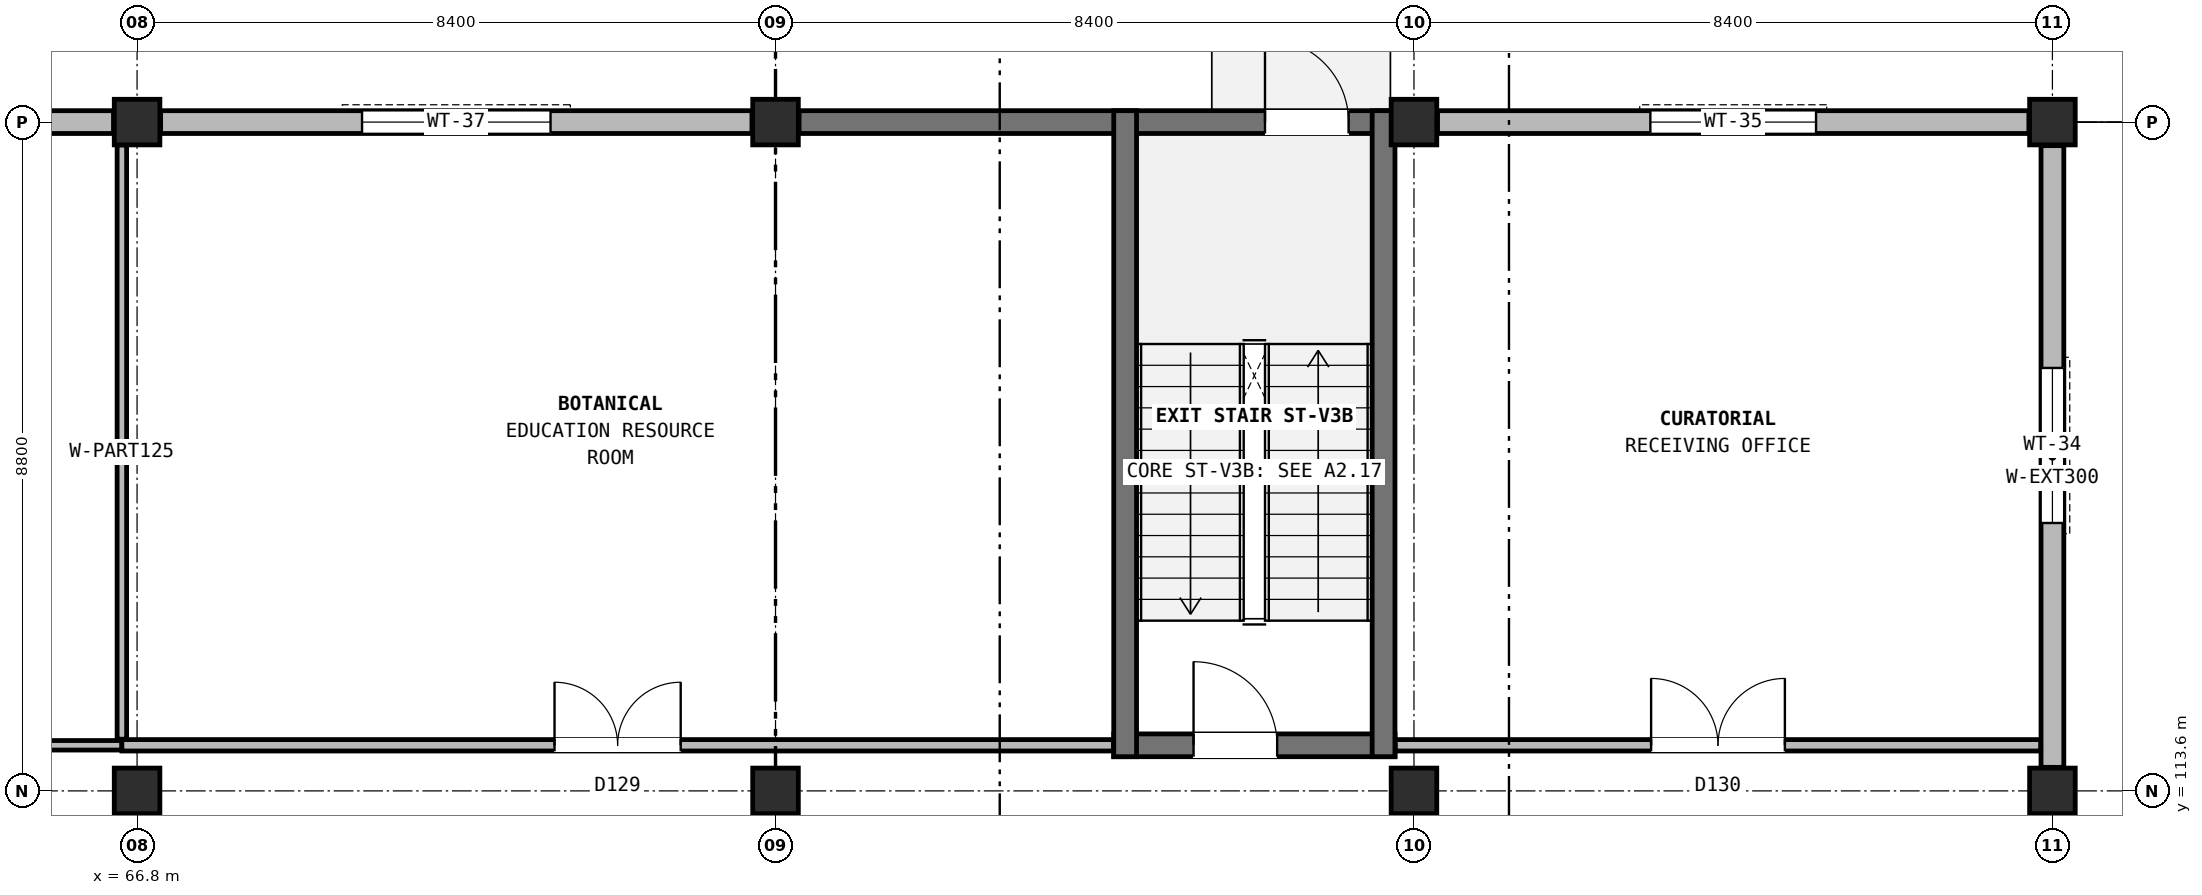
"""IFC4 building model, lengths in metres.
Left out: names, types, materials, properties, quantities, classifications, styles, units other than length and angle.
Written with IfcOpenShell. Run it as: python <this file> out.ifc"""

import sys

from ifc_helpers import new_model, si_unit, direction, frame, frame_2d, origin, origin_2d, place, context, subcontext, project, spatial, rectangle, extrude, element, fill, save


model = new_model("IFC4")
c1 = context("Model", 3, precision=1e-05, world=origin(), true_north=direction((0.0, 1.0)))
c2 = subcontext(c1, "Body", "Model", "MODEL_VIEW")
j1 = project(units=[si_unit("LENGTHUNIT", "METRE"), si_unit("PLANEANGLEUNIT", "RADIAN")], contexts=[c1])
p1 = place(None, origin())
s1 = spatial("IfcSite", under=j1, at=p1, CompositionType="ELEMENT")
p2 = place(p1, origin())
s2 = spatial("IfcBuilding", under=s1, at=p2, CompositionType="ELEMENT")
p3 = place(p2, origin())
s3 = spatial("IfcBuildingStorey", under=s2, at=p3, CompositionType="ELEMENT", Elevation=0.0)
for number, where, z_axis, x_axis in (
    (1, (66.8, 113.6, 0.0), (0.0, 0.0, 1.0), (1.0, 0.0, 0.0)),
    (2, (66.8, 122.4, 0.0), (0.0, 0.0, 1.0), (1.0, 0.0, 0.0)),
    (3, (75.2, 113.6, 0.0), (0.0, 0.0, 1.0), (1.0, 0.0, 0.0)),
    (4, (75.2, 122.4, 0.0), (0.0, 0.0, 1.0), (1.0, 0.0, 0.0)),
    (5, (83.6, 113.6, 0.0), (0.0, 0.0, 1.0), (1.0, 0.0, 0.0)),
    (6, (83.6, 122.4, 0.0), (0.0, 0.0, 1.0), (1.0, 0.0, 0.0)),
    (7, (92.0, 113.6, 0.0), (0.0, 0.0, 1.0), (1.0, 0.0, 0.0)),
    (8, (92.0, 122.4, 0.0), (0.0, 0.0, 1.0), (1.0, 0.0, 0.0)),
):
    element("IfcColumn", number, at=place(p3, frame(where, z_axis=z_axis, x_axis=x_axis)), inside=s3, PredefinedType="COLUMN", context=c2, shape_type="SweptSolid", body=[
        extrude(rectangle(XDim=0.6, YDim=0.6, at=origin_2d()), origin(), (0.0, 0.0, 1.0), 4.8),
    ])
p4 = place(p3, frame((92.0, 105.11, 0.0), z_axis=(0.0, 0.0, 1.0), x_axis=(0.0, 1.0, 0.0)))
e9 = element("IfcWall", 9, at=p4, inside=s3, PredefinedType="SOLIDWALL", context=c2, shape_type="SweptSolid", body=[
    extrude(rectangle(XDim=8.18, YDim=0.3, at=frame_2d((4.09, 0.0))), origin(), (0.0, 0.0, 1.0), 4.05),
])
p5 = place(p4, frame((2.005, 0.0, 0.9)))
e10 = element("IfcOpeningElement", 10, at=p5, cuts=e9, PredefinedType="OPENING", context=c2, shape_type="SweptSolid", body=[
    extrude(rectangle(XDim=1.88, YDim=1.96, at=frame_2d((0.94, 0.98))), frame((0.0, 0.16, 0.0), z_axis=(0.0, -1.0, 0.0), x_axis=(1.0, 0.0, 0.0)), (0.0, 0.0, 1.0), 0.32),
])
p6 = place(p3, frame((92.0, 113.91, 0.0), z_axis=(0.0, 0.0, 1.0), x_axis=(0.0, 1.0, 0.0)))
e11 = element("IfcWall", 11, at=p6, inside=s3, PredefinedType="SOLIDWALL", context=c2, shape_type="SweptSolid", body=[
    extrude(rectangle(XDim=8.18, YDim=0.3, at=frame_2d((4.09, 0.0))), origin(), (0.0, 0.0, 1.0), 4.05),
])
p7 = place(p6, frame((3.215, 0.0, 0.9)))
e12 = element("IfcOpeningElement", 12, at=p7, cuts=e11, PredefinedType="OPENING", context=c2, shape_type="SweptSolid", body=[
    extrude(rectangle(XDim=2.04, YDim=1.98, at=frame_2d((1.02, 0.99))), frame((0.0, 0.16, 0.0), z_axis=(0.0, -1.0, 0.0), x_axis=(1.0, 0.0, 0.0)), (0.0, 0.0, 1.0), 0.32),
])
p8 = place(p3, frame((91.69, 122.4, 0.0), z_axis=(0.0, 0.0, 1.0), x_axis=(-1.0, 0.0, 0.0)))
e13 = element("IfcWall", 13, at=p8, inside=s3, PredefinedType="SOLIDWALL", context=c2, shape_type="SweptSolid", body=[
    extrude(rectangle(XDim=7.78, YDim=0.3, at=frame_2d((3.89, 0.0))), origin(), (0.0, 0.0, 1.0), 4.05),
])
p9 = place(p8, frame((2.8, 0.0, 0.9)))
e14 = element("IfcOpeningElement", 14, at=p9, cuts=e13, PredefinedType="OPENING", context=c2, shape_type="SweptSolid", body=[
    extrude(rectangle(XDim=2.18, YDim=2.02, at=frame_2d((1.09, 1.01))), frame((0.0, 0.16, 0.0), z_axis=(0.0, -1.0, 0.0), x_axis=(1.0, 0.0, 0.0)), (0.0, 0.0, 1.0), 0.32),
])
p10 = place(p3, frame((83.29, 122.4, 0.0), z_axis=(0.0, 0.0, 1.0), x_axis=(-1.0, 0.0, 0.0)))
e15 = element("IfcWall", 15, at=p10, inside=s3, PredefinedType="SHEAR", context=c2, shape_type="SweptSolid", body=[
    extrude(rectangle(XDim=7.78, YDim=0.3, at=frame_2d((3.89, 0.0))), origin(), (0.0, 0.0, 1.0), 4.05),
])
p11 = place(p10, frame((0.55, 0.0, 0.0)))
e16 = element("IfcOpeningElement", 16, at=p11, cuts=e15, PredefinedType="OPENING", context=c2, shape_type="SweptSolid", body=[
    extrude(rectangle(XDim=1.1, YDim=2.2, at=frame_2d((0.55, 1.1))), frame((0.0, 0.16, 0.0), z_axis=(0.0, -1.0, 0.0), x_axis=(1.0, 0.0, 0.0)), (0.0, 0.0, 1.0), 0.32),
])
p12 = place(p3, frame((74.89, 122.4, 0.0), z_axis=(0.0, 0.0, 1.0), x_axis=(-1.0, 0.0, 0.0)))
e17 = element("IfcWall", 17, at=p12, inside=s3, PredefinedType="SOLIDWALL", context=c2, shape_type="SweptSolid", body=[
    extrude(rectangle(XDim=7.78, YDim=0.3, at=frame_2d((3.89, 0.0))), origin(), (0.0, 0.0, 1.0), 4.05),
])
p13 = place(p12, frame((2.65, 0.0, 0.9)))
e18 = element("IfcOpeningElement", 18, at=p13, cuts=e17, PredefinedType="OPENING", context=c2, shape_type="SweptSolid", body=[
    extrude(rectangle(XDim=2.48, YDim=2.08, at=frame_2d((1.24, 1.04))), frame((0.0, 0.16, 0.0), z_axis=(0.0, -1.0, 0.0), x_axis=(1.0, 0.0, 0.0)), (0.0, 0.0, 1.0), 0.32),
])
p14 = place(p3, frame((66.49, 122.4, 0.0), z_axis=(0.0, 0.0, 1.0), x_axis=(-1.0, 0.0, 0.0)))
e19 = element("IfcWall", 19, at=p14, inside=s3, PredefinedType="SOLIDWALL", context=c2, shape_type="SweptSolid", body=[
    extrude(rectangle(XDim=7.78, YDim=0.3, at=frame_2d((3.89, 0.0))), origin(), (0.0, 0.0, 1.0), 4.05),
])
p15 = place(p14, frame((2.55, 0.0, 0.9)))
e20 = element("IfcOpeningElement", 20, at=p15, cuts=e19, PredefinedType="OPENING", context=c2, shape_type="SweptSolid", body=[
    extrude(rectangle(XDim=2.68, YDim=2.12, at=frame_2d((1.34, 1.06))), frame((0.0, 0.16, 0.0), z_axis=(0.0, -1.0, 0.0), x_axis=(1.0, 0.0, 0.0)), (0.0, 0.0, 1.0), 0.32),
])
p16 = place(p3, frame((79.65, 114.2, 0.0), z_axis=(0.0, 0.0, 1.0), x_axis=(1.0, 0.0, 0.0)))
e21 = element("IfcWall", 21, at=p16, inside=s3, PredefinedType="SHEAR", context=c2, shape_type="SweptSolid", body=[
    extrude(rectangle(XDim=3.7, YDim=0.3, at=frame_2d((1.85, 0.0))), origin(), (0.0, 0.0, 1.0), 4.8),
])
p17 = place(p16, frame((1.05, 0.0, 0.0)))
e22 = element("IfcOpeningElement", 22, at=p17, cuts=e21, PredefinedType="OPENING", context=c2, shape_type="SweptSolid", body=[
    extrude(rectangle(XDim=1.1, YDim=2.2, at=frame_2d((0.55, 1.1))), frame((0.0, 0.16, 0.0), z_axis=(0.0, -1.0, 0.0), x_axis=(1.0, 0.0, 0.0)), (0.0, 0.0, 1.0), 0.32),
])
for number, where, z_axis, x_axis in (
    (23, (79.8, 114.05, 0.0), (0.0, 0.0, 1.0), (0.0, 1.0, 0.0)),
    (24, (83.2, 114.05, 0.0), (0.0, 0.0, 1.0), (0.0, 1.0, 0.0)),
):
    element("IfcWall", number, at=place(p3, frame(where, z_axis=z_axis, x_axis=x_axis)), inside=s3, PredefinedType="SHEAR", context=c2, shape_type="SweptSolid", body=[
        extrude(rectangle(XDim=8.5, YDim=0.3, at=frame_2d((4.25, 0.0))), origin(), (0.0, 0.0, 1.0), 4.8),
    ])
p18 = place(p3, frame((58.2, 114.2, 0.0), z_axis=(0.0, 0.0, 1.0), x_axis=(1.0, 0.0, 0.0)))
e25 = element("IfcWall", 25, at=p18, inside=s3, PredefinedType="PARTITIONING", context=c2, shape_type="SweptSolid", body=[
    extrude(rectangle(XDim=8.4, YDim=0.125, at=frame_2d((4.2, 0.0))), origin(), (0.0, 0.0, 1.0), 4.465),
])
p19 = place(p18, frame((3.71, 0.0, 0.0)))
e26 = element("IfcOpeningElement", 26, at=p19, cuts=e25, PredefinedType="OPENING", context=c2, shape_type="SweptSolid", body=[
    extrude(rectangle(XDim=0.98, YDim=2.1, at=frame_2d((0.49, 1.05))), frame((0.0, 0.073, 0.0), z_axis=(0.0, -1.0, 0.0), x_axis=(1.0, 0.0, 0.0)), (0.0, 0.0, 1.0), 0.145),
])
p20 = place(p3, frame((66.6, 114.2, 0.0), z_axis=(0.0, 0.0, 1.0), x_axis=(1.0, 0.0, 0.0)))
e27 = element("IfcWall", 27, at=p20, inside=s3, PredefinedType="PARTITIONING", context=c2, shape_type="SweptSolid", body=[
    extrude(rectangle(XDim=13.045, YDim=0.15, at=frame_2d((6.522, 0.0))), origin(), (0.0, 0.0, 1.0), 4.465),
])
p21 = place(p20, frame((5.692, 0.0, 0.0)))
e28 = element("IfcOpeningElement", 28, at=p21, cuts=e27, PredefinedType="OPENING", context=c2, shape_type="SweptSolid", body=[
    extrude(rectangle(XDim=1.66, YDim=2.34, at=frame_2d((0.83, 1.17))), frame((0.0, 0.085, 0.0), z_axis=(0.0, -1.0, 0.0), x_axis=(1.0, 0.0, 0.0)), (0.0, 0.0, 1.0), 0.17),
])
p22 = place(p3, frame((83.355, 114.2, 0.0), z_axis=(0.0, 0.0, 1.0), x_axis=(1.0, 0.0, 0.0)))
e29 = element("IfcWall", 29, at=p22, inside=s3, PredefinedType="PARTITIONING", context=c2, shape_type="SweptSolid", body=[
    extrude(rectangle(XDim=8.49, YDim=0.15, at=frame_2d((4.245, 0.0))), origin(), (0.0, 0.0, 1.0), 4.465),
])
p23 = place(p22, frame((3.365, 0.0, 0.0)))
e30 = element("IfcOpeningElement", 30, at=p23, cuts=e29, PredefinedType="OPENING", context=c2, shape_type="SweptSolid", body=[
    extrude(rectangle(XDim=1.76, YDim=2.36, at=frame_2d((0.88, 1.18))), frame((0.0, 0.085, 0.0), z_axis=(0.0, -1.0, 0.0), x_axis=(1.0, 0.0, 0.0)), (0.0, 0.0, 1.0), 0.17),
])
p24 = place(p3, frame((66.6, 114.28, 0.0), z_axis=(0.0, 0.0, 1.0), x_axis=(0.0, 1.0, 0.0)))
e31 = element("IfcWall", 31, at=p24, inside=s3, PredefinedType="PARTITIONING", context=c2, shape_type="SweptSolid", body=[
    extrude(rectangle(XDim=7.82, YDim=0.125, at=frame_2d((3.91, 0.0))), origin(), (0.0, 0.0, 1.0), 4.045),
])
p25 = place(p7, origin())
e32 = element("IfcWindow", 32, at=p25, inside=s3, PartitioningType="SINGLE_PANEL", PredefinedType="WINDOW", context=c2, shape_type="SweptSolid", body=[
    extrude(rectangle(XDim=2.04, YDim=1.98, at=frame_2d((1.02, 0.99))), frame((0.0, 0.03, 0.0), z_axis=(0.0, -1.0, 0.0), x_axis=(1.0, 0.0, 0.0)), (0.0, 0.0, 1.0), 0.06),
])
fill(e12, e32)
p26 = place(p9, origin())
e33 = element("IfcWindow", 33, at=p26, inside=s3, PartitioningType="SINGLE_PANEL", PredefinedType="WINDOW", context=c2, shape_type="SweptSolid", body=[
    extrude(rectangle(XDim=2.18, YDim=2.02, at=frame_2d((1.09, 1.01))), frame((0.0, 0.03, 0.0), z_axis=(0.0, -1.0, 0.0), x_axis=(1.0, 0.0, 0.0)), (0.0, 0.0, 1.0), 0.06),
])
fill(e14, e33)
p27 = place(p11, frame((1.1, 0.0, 0.0), z_axis=(0.0, 0.0, 1.0), x_axis=(-1.0, 0.0, 0.0)))
e34 = element("IfcDoor", 34, at=p27, inside=s3, OperationType="SINGLE_SWING_RIGHT", PredefinedType="DOOR", context=c2, shape_type="SweptSolid", body=[
    extrude(rectangle(XDim=1.1, YDim=2.2, at=frame_2d((0.55, 1.1))), frame((0.0, 0.025, 0.0), z_axis=(0.0, -1.0, 0.0), x_axis=(1.0, 0.0, 0.0)), (0.0, 0.0, 1.0), 0.05),
])
fill(e16, e34)
p28 = place(p13, origin())
e35 = element("IfcWindow", 35, at=p28, inside=s3, PartitioningType="SINGLE_PANEL", PredefinedType="WINDOW", context=c2, shape_type="SweptSolid", body=[
    extrude(rectangle(XDim=2.48, YDim=2.08, at=frame_2d((1.24, 1.04))), frame((0.0, 0.03, 0.0), z_axis=(0.0, -1.0, 0.0), x_axis=(1.0, 0.0, 0.0)), (0.0, 0.0, 1.0), 0.06),
])
fill(e18, e35)
p29 = place(p17, origin())
e36 = element("IfcDoor", 36, at=p29, inside=s3, OperationType="SINGLE_SWING_LEFT", PredefinedType="DOOR", context=c2, shape_type="SweptSolid", body=[
    extrude(rectangle(XDim=1.1, YDim=2.2, at=frame_2d((0.55, 1.1))), frame((0.0, 0.025, 0.0), z_axis=(0.0, -1.0, 0.0), x_axis=(1.0, 0.0, 0.0)), (0.0, 0.0, 1.0), 0.05),
])
fill(e22, e36)
p30 = place(p21, origin())
e37 = element("IfcDoor", 37, at=p30, inside=s3, OperationType="DOUBLE_DOOR_SINGLE_SWING", PredefinedType="DOOR", context=c2, shape_type="SweptSolid", body=[
    extrude(rectangle(XDim=1.66, YDim=2.34, at=frame_2d((0.83, 1.17))), frame((0.0, 0.025, 0.0), z_axis=(0.0, -1.0, 0.0), x_axis=(1.0, 0.0, 0.0)), (0.0, 0.0, 1.0), 0.05),
])
fill(e28, e37)
p31 = place(p23, origin())
e38 = element("IfcDoor", 38, at=p31, inside=s3, OperationType="DOUBLE_DOOR_SINGLE_SWING", PredefinedType="DOOR", context=c2, shape_type="SweptSolid", body=[
    extrude(rectangle(XDim=1.76, YDim=2.36, at=frame_2d((0.88, 1.18))), frame((0.0, 0.025, 0.0), z_axis=(0.0, -1.0, 0.0), x_axis=(1.0, 0.0, 0.0)), (0.0, 0.0, 1.0), 0.05),
])
fill(e30, e38)
save(model, sys.argv[1])
